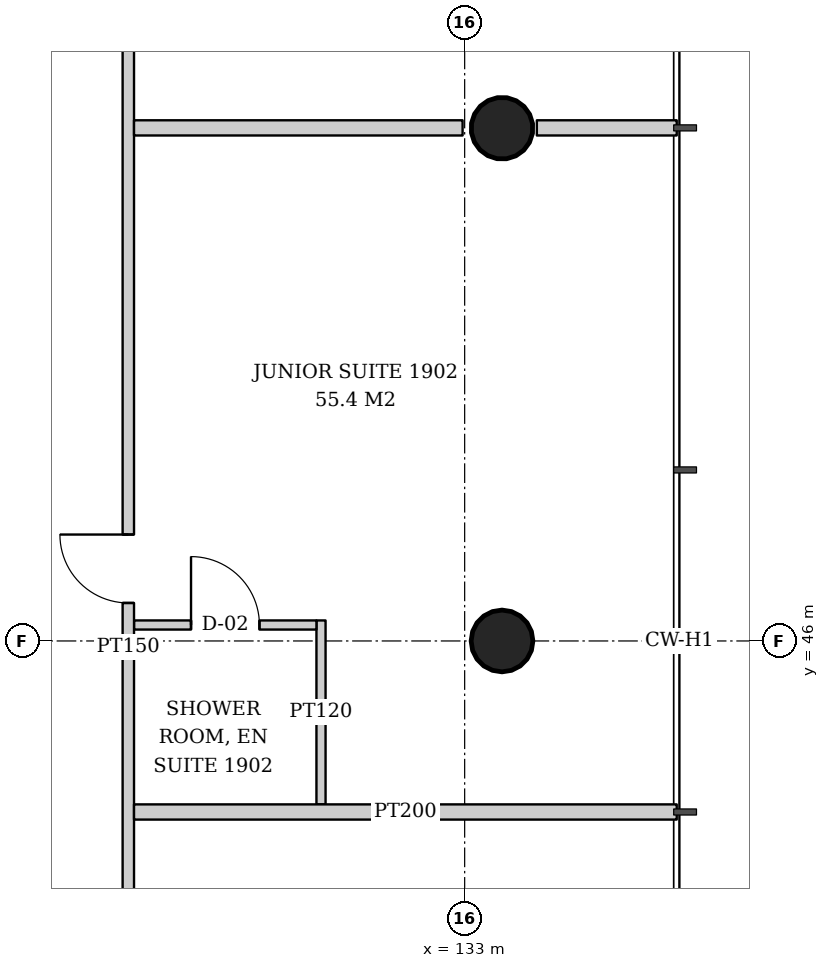
"""IFC4 building model, lengths in metres.
Left out: names, types, materials, properties, quantities, classifications, styles, units other than length and angle.
Written with IfcOpenShell. Run it as: python <this file> out.ifc"""

import sys

from ifc_helpers import new_model, si_unit, direction, frame, frame_2d, origin, origin_2d, place, context, subcontext, project, spatial, rectangle, hollow_circle, extrude, element, fill, save


model = new_model("IFC4")
c1 = context("Model", 3, precision=1e-05, world=origin(), true_north=direction((0.0, 1.0)))
c2 = subcontext(c1, "Body", "Model", "MODEL_VIEW")
j1 = project(units=[si_unit("LENGTHUNIT", "METRE"), si_unit("PLANEANGLEUNIT", "RADIAN")], contexts=[c1])
p1 = place(None, origin())
s1 = spatial("IfcSite", under=j1, at=p1, CompositionType="ELEMENT")
p2 = place(p1, origin())
s2 = spatial("IfcBuilding", under=s1, at=p2, CompositionType="ELEMENT")
p3 = place(p2, frame((0.0, 0.0, 78.0)))
s3 = spatial("IfcBuildingStorey", under=s2, at=p3, CompositionType="ELEMENT", Elevation=78.0)
p4 = place(p3, frame((133.543, 46.0, 0.0), z_axis=(-0.043069538298, 0.0, 0.999072076915), x_axis=(0.0, -1.0, 0.0)))
e1 = element("IfcColumn", 1, at=p4, inside=s3, PredefinedType="COLUMN", context=c2, shape_type="SweptSolid", body=[
    extrude(hollow_circle(Radius=0.406, WallThickness=0.03, at=origin_2d()), origin(), (0.0, 0.0, 1.0), 3.803),
])
p5 = place(p3, frame((133.543, 52.771, 0.0), z_axis=(-0.043059584825, -0.021497706284, 0.998841188968), x_axis=(0.446680166538, -0.894693706707, 0.0)))
e2 = element("IfcColumn", 2, at=p5, inside=s3, PredefinedType="COLUMN", context=c2, shape_type="SweptSolid", body=[
    extrude(hollow_circle(Radius=0.406, WallThickness=0.03, at=origin_2d()), origin(), (0.0, 0.0, 1.0), 3.804),
])
p6 = place(p3, frame((131.11, 43.85, 0.0), z_axis=(0.0, 0.0, 1.0), x_axis=(0.0, 1.0, 0.0)))
e3 = element("IfcWall", 3, at=p6, inside=s3, PredefinedType="PARTITIONING", context=c2, shape_type="SweptSolid", body=[
    extrude(rectangle(XDim=2.42, YDim=0.12, at=frame_2d((1.21, 0.0))), origin(), (0.0, 0.0, 1.0), 2.72),
])
p7 = place(p3, frame((128.65, 46.21, 0.0), z_axis=(0.0, 0.0, 1.0), x_axis=(1.0, 0.0, 0.0)))
e4 = element("IfcWall", 4, at=p7, inside=s3, PredefinedType="PARTITIONING", context=c2, shape_type="SweptSolid", body=[
    extrude(rectangle(XDim=2.4, YDim=0.12, at=frame_2d((1.2, 0.0))), origin(), (0.0, 0.0, 1.0), 3.52),
])
p8 = place(p7, frame((0.75, 0.0, 0.0)))
e5 = element("IfcOpeningElement", 5, at=p8, cuts=e4, PredefinedType="OPENING", context=c2, shape_type="SweptSolid", body=[
    extrude(rectangle(XDim=0.9, YDim=2.1, at=frame_2d((0.45, 1.05))), frame((0.0, 0.07, 0.0), z_axis=(0.0, -1.0, 0.0), x_axis=(1.0, 0.0, 0.0)), (0.0, 0.0, 1.0), 0.14),
])
p9 = place(p3, frame((128.575, 34.35, 0.0), z_axis=(0.0, 0.0, 1.0), x_axis=(0.0, 1.0, 0.0)))
e6 = element("IfcWall", 6, at=p9, inside=s3, PredefinedType="PARTITIONING", context=c2, shape_type="SweptSolid", body=[
    extrude(rectangle(XDim=23.15, YDim=0.15, at=frame_2d((11.575, 0.0))), origin(), (0.0, 0.0, 1.0), 2.72),
])
p10 = place(p9, frame((2.025, 0.0, 0.0)))
e7 = element("IfcOpeningElement", 7, at=p10, cuts=e6, PredefinedType="OPENING", context=c2, shape_type="SweptSolid", body=[
    extrude(rectangle(XDim=0.9, YDim=2.1, at=frame_2d((0.45, 1.05))), frame((0.0, 0.085, 0.0), z_axis=(0.0, -1.0, 0.0), x_axis=(1.0, 0.0, 0.0)), (0.0, 0.0, 1.0), 0.17),
])
p11 = place(p9, frame((12.15, 0.0, 0.0)))
e8 = element("IfcOpeningElement", 8, at=p11, cuts=e6, PredefinedType="OPENING", context=c2, shape_type="SweptSolid", body=[
    extrude(rectangle(XDim=0.9, YDim=2.1, at=frame_2d((0.45, 1.05))), frame((0.0, 0.085, 0.0), z_axis=(0.0, -1.0, 0.0), x_axis=(1.0, 0.0, 0.0)), (0.0, 0.0, 1.0), 0.17),
])
p12 = place(p3, frame((128.65, 43.75, 0.0), z_axis=(0.0, 0.0, 1.0), x_axis=(1.0, 0.0, 0.0)))
e9 = element("IfcWall", 9, at=p12, inside=s3, PredefinedType="PARTITIONING", context=c2, shape_type="SweptSolid", body=[
    extrude(rectangle(XDim=7.14, YDim=0.2, at=frame_2d((3.57, 0.0))), origin(), (0.0, 0.0, 1.0), 3.12),
])
p13 = place(p3, frame((128.65, 52.75, 0.0), z_axis=(0.0, 0.0, 1.0), x_axis=(1.0, 0.0, 0.0)))
e10 = element("IfcWall", 10, at=p13, inside=s3, PredefinedType="PARTITIONING", context=c2, shape_type="SweptSolid", body=[
    extrude(rectangle(XDim=4.323, YDim=0.2, at=frame_2d((2.162, 0.0))), origin(), (0.0, 0.0, 1.0), 3.52),
])
p14 = place(p3, frame((133.95, 52.75, 0.0), z_axis=(0.0, 0.0, 1.0), x_axis=(1.0, 0.0, 0.0)))
e11 = element("IfcWall", 11, at=p14, inside=s3, PredefinedType="PARTITIONING", context=c2, shape_type="SweptSolid", body=[
    extrude(rectangle(XDim=1.84, YDim=0.2, at=frame_2d((0.92, 0.0))), origin(), (0.0, 0.0, 1.0), 3.52),
])
p15 = place(p8, origin())
e12 = element("IfcDoor", 12, at=p15, inside=s3, OperationType="SINGLE_SWING_LEFT", PredefinedType="DOOR", context=c2, shape_type="SweptSolid", body=[
    extrude(rectangle(XDim=0.9, YDim=2.1, at=frame_2d((0.45, 1.05))), frame((0.0, 0.025, 0.0), z_axis=(0.0, -1.0, 0.0), x_axis=(1.0, 0.0, 0.0)), (0.0, 0.0, 1.0), 0.05),
])
fill(e5, e12)
p16 = place(p11, origin())
e13 = element("IfcDoor", 13, at=p16, inside=s3, OperationType="SINGLE_SWING_RIGHT", PredefinedType="DOOR", context=c2, shape_type="SweptSolid", body=[
    extrude(rectangle(XDim=0.9, YDim=2.1, at=frame_2d((0.45, 1.05))), frame((0.0, 0.025, 0.0), z_axis=(0.0, -1.0, 0.0), x_axis=(1.0, 0.0, 0.0)), (0.0, 0.0, 1.0), 0.05),
])
fill(e8, e13)
save(model, sys.argv[1])
